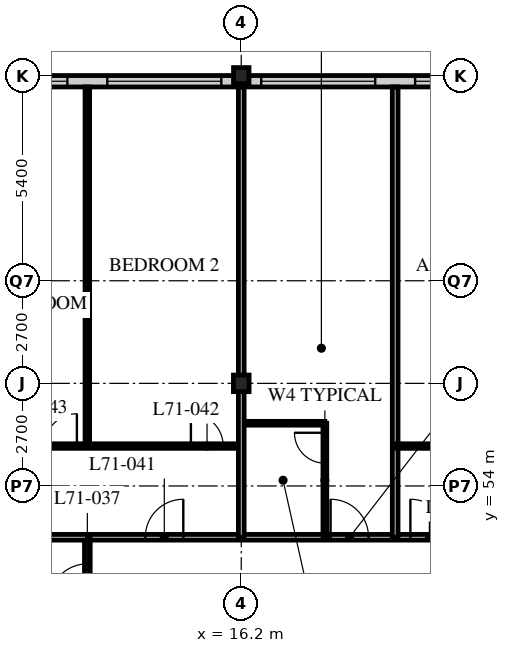
"""IFC4 building model, lengths in metres.
Left out: names, types, materials, properties, quantities, classifications, styles, units other than length and angle.
Written with IfcOpenShell. Run it as: python <this file> out.ifc"""

import sys

from ifc_helpers import new_model, si_unit, direction, frame, frame_2d, origin, origin_2d, place, context, subcontext, project, spatial, rectangle, i_section, extrude, element, fill, save


model = new_model("IFC4")
c1 = context("Model", 3, precision=1e-05, world=origin(), true_north=direction((0.0, 1.0)))
c2 = subcontext(c1, "Body", "Model", "MODEL_VIEW")
j1 = project(units=[si_unit("LENGTHUNIT", "METRE"), si_unit("PLANEANGLEUNIT", "RADIAN")], contexts=[c1])
p1 = place(None, origin())
s1 = spatial("IfcSite", under=j1, at=p1, CompositionType="ELEMENT")
p2 = place(p1, origin())
s2 = spatial("IfcBuilding", under=s1, at=p2, CompositionType="ELEMENT")
p3 = place(p2, frame((0.0, 0.0, 277.5)))
s3 = spatial("IfcBuildingStorey", under=s2, at=p3, CompositionType="ELEMENT", Elevation=277.5)
p4 = place(p3, frame((16.2, 56.7, 0.0), z_axis=(0.0, 0.0, 1.0), x_axis=(1.0, 0.0, 0.0)))
e1 = element("IfcColumn", 1, at=p4, inside=s3, PredefinedType="COLUMN", context=c2, shape_type="SweptSolid", body=[
    extrude(i_section(OverallWidth=0.412, OverallDepth=0.437, WebThickness=0.036, FlangeThickness=0.058, FilletRadius=0.015, at=origin_2d()), origin(), (0.0, 0.0, 1.0), 3.9),
])
p5 = place(p3, frame((16.2, 64.8, 0.0), z_axis=(0.0, 0.0, 1.0), x_axis=(1.0, 0.0, 0.0)))
e2 = element("IfcColumn", 2, at=p5, inside=s3, PredefinedType="COLUMN", context=c2, shape_type="SweptSolid", body=[
    extrude(i_section(OverallWidth=0.407, OverallDepth=0.419, WebThickness=0.031, FlangeThickness=0.049, FilletRadius=0.015, at=origin_2d()), origin(), (0.0, 0.0, 1.0), 3.9),
])
p6 = place(p3, frame((48.3, 64.65, 0.0), z_axis=(0.0, 0.0, 1.0), x_axis=(-1.0, 0.0, 0.0)))
e3 = element("IfcWall", 3, at=p6, inside=s3, PredefinedType="SOLIDWALL", context=c2, shape_type="SweptSolid", body=[
    extrude(rectangle(XDim=40.2, YDim=0.3, at=frame_2d((20.1, 0.0))), origin(), (0.0, 0.0, 1.0), 3.69),
])
p7 = place(p6, frame((0.225, 0.0, 0.6)))
e4 = element("IfcOpeningElement", 4, at=p7, cuts=e3, PredefinedType="OPENING", context=c2, shape_type="SweptSolid", body=[
    extrude(rectangle(XDim=3.0, YDim=2.4, at=frame_2d((1.5, 1.2))), frame((0.0, 0.16, 0.0), z_axis=(0.0, -1.0, 0.0), x_axis=(1.0, 0.0, 0.0)), (0.0, 0.0, 1.0), 0.32),
])
p8 = place(p6, frame((4.275, 0.0, 0.6)))
e5 = element("IfcOpeningElement", 5, at=p8, cuts=e3, PredefinedType="OPENING", context=c2, shape_type="SweptSolid", body=[
    extrude(rectangle(XDim=3.0, YDim=2.4, at=frame_2d((1.5, 1.2))), frame((0.0, 0.16, 0.0), z_axis=(0.0, -1.0, 0.0), x_axis=(1.0, 0.0, 0.0)), (0.0, 0.0, 1.0), 0.32),
])
p9 = place(p6, frame((8.325, 0.0, 0.6)))
e6 = element("IfcOpeningElement", 6, at=p9, cuts=e3, PredefinedType="OPENING", context=c2, shape_type="SweptSolid", body=[
    extrude(rectangle(XDim=3.0, YDim=2.4, at=frame_2d((1.5, 1.2))), frame((0.0, 0.16, 0.0), z_axis=(0.0, -1.0, 0.0), x_axis=(1.0, 0.0, 0.0)), (0.0, 0.0, 1.0), 0.32),
])
p10 = place(p6, frame((12.375, 0.0, 0.6)))
e7 = element("IfcOpeningElement", 7, at=p10, cuts=e3, PredefinedType="OPENING", context=c2, shape_type="SweptSolid", body=[
    extrude(rectangle(XDim=3.0, YDim=2.4, at=frame_2d((1.5, 1.2))), frame((0.0, 0.16, 0.0), z_axis=(0.0, -1.0, 0.0), x_axis=(1.0, 0.0, 0.0)), (0.0, 0.0, 1.0), 0.32),
])
p11 = place(p6, frame((16.425, 0.0, 0.6)))
e8 = element("IfcOpeningElement", 8, at=p11, cuts=e3, PredefinedType="OPENING", context=c2, shape_type="SweptSolid", body=[
    extrude(rectangle(XDim=3.0, YDim=2.4, at=frame_2d((1.5, 1.2))), frame((0.0, 0.16, 0.0), z_axis=(0.0, -1.0, 0.0), x_axis=(1.0, 0.0, 0.0)), (0.0, 0.0, 1.0), 0.32),
])
p12 = place(p6, frame((20.475, 0.0, 0.6)))
e9 = element("IfcOpeningElement", 9, at=p12, cuts=e3, PredefinedType="OPENING", context=c2, shape_type="SweptSolid", body=[
    extrude(rectangle(XDim=3.0, YDim=2.4, at=frame_2d((1.5, 1.2))), frame((0.0, 0.16, 0.0), z_axis=(0.0, -1.0, 0.0), x_axis=(1.0, 0.0, 0.0)), (0.0, 0.0, 1.0), 0.32),
])
p13 = place(p6, frame((24.525, 0.0, 0.6)))
e10 = element("IfcOpeningElement", 10, at=p13, cuts=e3, PredefinedType="OPENING", context=c2, shape_type="SweptSolid", body=[
    extrude(rectangle(XDim=3.0, YDim=2.4, at=frame_2d((1.5, 1.2))), frame((0.0, 0.16, 0.0), z_axis=(0.0, -1.0, 0.0), x_axis=(1.0, 0.0, 0.0)), (0.0, 0.0, 1.0), 0.32),
])
p14 = place(p6, frame((28.575, 0.0, 0.6)))
e11 = element("IfcOpeningElement", 11, at=p14, cuts=e3, PredefinedType="OPENING", context=c2, shape_type="SweptSolid", body=[
    extrude(rectangle(XDim=3.0, YDim=2.4, at=frame_2d((1.5, 1.2))), frame((0.0, 0.16, 0.0), z_axis=(0.0, -1.0, 0.0), x_axis=(1.0, 0.0, 0.0)), (0.0, 0.0, 1.0), 0.32),
])
p15 = place(p6, frame((32.625, 0.0, 0.6)))
e12 = element("IfcOpeningElement", 12, at=p15, cuts=e3, PredefinedType="OPENING", context=c2, shape_type="SweptSolid", body=[
    extrude(rectangle(XDim=3.0, YDim=2.4, at=frame_2d((1.5, 1.2))), frame((0.0, 0.16, 0.0), z_axis=(0.0, -1.0, 0.0), x_axis=(1.0, 0.0, 0.0)), (0.0, 0.0, 1.0), 0.32),
])
p16 = place(p6, frame((36.675, 0.0, 0.6)))
e13 = element("IfcOpeningElement", 13, at=p16, cuts=e3, PredefinedType="OPENING", context=c2, shape_type="SweptSolid", body=[
    extrude(rectangle(XDim=3.0, YDim=2.4, at=frame_2d((1.5, 1.2))), frame((0.0, 0.16, 0.0), z_axis=(0.0, -1.0, 0.0), x_axis=(1.0, 0.0, 0.0)), (0.0, 0.0, 1.0), 0.32),
])
p17 = place(p3, frame((12.15, 52.65, 0.0), z_axis=(0.0, 0.0, 1.0), x_axis=(1.0, 0.0, 0.0)))
e14 = element("IfcWall", 14, at=p17, inside=s3, PredefinedType="PARTITIONING", context=c2, shape_type="SweptSolid", body=[
    extrude(rectangle(XDim=24.3, YDim=0.15, at=frame_2d((12.15, 0.0))), origin(), (0.0, 0.0, 1.0), 3.69),
])
p18 = place(p17, frame((6.4, 0.0, 0.0)))
e15 = element("IfcOpeningElement", 15, at=p18, cuts=e14, PredefinedType="OPENING", context=c2, shape_type="SweptSolid", body=[
    extrude(rectangle(XDim=1.0, YDim=2.1, at=frame_2d((0.5, 1.05))), frame((0.0, 0.085, 0.0), z_axis=(0.0, -1.0, 0.0), x_axis=(1.0, 0.0, 0.0)), (0.0, 0.0, 1.0), 0.17),
])
p19 = place(p17, frame((8.5, 0.0, 0.0)))
e16 = element("IfcOpeningElement", 16, at=p19, cuts=e14, PredefinedType="OPENING", context=c2, shape_type="SweptSolid", body=[
    extrude(rectangle(XDim=1.0, YDim=2.1, at=frame_2d((0.5, 1.05))), frame((0.0, 0.085, 0.0), z_axis=(0.0, -1.0, 0.0), x_axis=(1.0, 0.0, 0.0)), (0.0, 0.0, 1.0), 0.17),
])
p20 = place(p17, frame((16.6, 0.0, 0.0)))
e17 = element("IfcOpeningElement", 17, at=p20, cuts=e14, PredefinedType="OPENING", context=c2, shape_type="SweptSolid", body=[
    extrude(rectangle(XDim=1.0, YDim=2.1, at=frame_2d((0.5, 1.05))), frame((0.0, 0.085, 0.0), z_axis=(0.0, -1.0, 0.0), x_axis=(1.0, 0.0, 0.0)), (0.0, 0.0, 1.0), 0.17),
])
p21 = place(p17, frame((1.525, 0.0, 0.0)))
e18 = element("IfcOpeningElement", 18, at=p21, cuts=e14, PredefinedType="OPENING", context=c2, shape_type="SweptSolid", body=[
    extrude(rectangle(XDim=1.0, YDim=2.1, at=frame_2d((0.5, 1.05))), frame((0.0, 0.085, 0.0), z_axis=(0.0, -1.0, 0.0), x_axis=(1.0, 0.0, 0.0)), (0.0, 0.0, 1.0), 0.17),
])
p22 = place(p3, frame((12.15, 22.5, 0.0), z_axis=(0.0, 0.0, 1.0), x_axis=(0.0, 1.0, 0.0)))
e19 = element("IfcWall", 19, at=p22, inside=s3, PredefinedType="PARTITIONING", context=c2, shape_type="SweptSolid", body=[
    extrude(rectangle(XDim=30.15, YDim=0.15, at=frame_2d((15.075, 0.0))), origin(), (0.0, 0.0, 1.0), 3.69),
])
p23 = place(p22, frame((0.4, 0.0, 0.0)))
e20 = element("IfcOpeningElement", 20, at=p23, cuts=e19, PredefinedType="OPENING", context=c2, shape_type="SweptSolid", body=[
    extrude(rectangle(XDim=1.0, YDim=2.1, at=frame_2d((0.5, 1.05))), frame((0.0, 0.085, 0.0), z_axis=(0.0, -1.0, 0.0), x_axis=(1.0, 0.0, 0.0)), (0.0, 0.0, 1.0), 0.17),
])
p24 = place(p22, frame((18.4, 0.0, 0.0)))
e21 = element("IfcOpeningElement", 21, at=p24, cuts=e19, PredefinedType="OPENING", context=c2, shape_type="SweptSolid", body=[
    extrude(rectangle(XDim=1.0, YDim=2.1, at=frame_2d((0.5, 1.05))), frame((0.0, 0.085, 0.0), z_axis=(0.0, -1.0, 0.0), x_axis=(1.0, 0.0, 0.0)), (0.0, 0.0, 1.0), 0.17),
])
p25 = place(p22, frame((28.45, 0.0, 0.0)))
e22 = element("IfcOpeningElement", 22, at=p25, cuts=e19, PredefinedType="OPENING", context=c2, shape_type="SweptSolid", body=[
    extrude(rectangle(XDim=1.0, YDim=2.1, at=frame_2d((0.5, 1.05))), frame((0.0, 0.085, 0.0), z_axis=(0.0, -1.0, 0.0), x_axis=(1.0, 0.0, 0.0)), (0.0, 0.0, 1.0), 0.17),
])
p26 = place(p3, frame((16.2, 55.65, 0.0), z_axis=(0.0, 0.0, 1.0), x_axis=(1.0, 0.0, 0.0)))
e23 = element("IfcWall", 23, at=p26, inside=s3, PredefinedType="PARTITIONING", context=c2, shape_type="SweptSolid", body=[
    extrude(rectangle(XDim=2.2, YDim=0.1, at=frame_2d((1.1, 0.0))), origin(), (0.0, 0.0, 1.0), 3.69),
])
p27 = place(p3, frame((18.4, 52.65, 0.0), z_axis=(0.0, 0.0, 1.0), x_axis=(0.0, 1.0, 0.0)))
e24 = element("IfcWall", 24, at=p27, inside=s3, PredefinedType="PARTITIONING", context=c2, shape_type="SweptSolid", body=[
    extrude(rectangle(XDim=3.0, YDim=0.1, at=frame_2d((1.5, 0.0))), origin(), (0.0, 0.0, 1.0), 3.69),
])
p28 = place(p27, frame((1.95, 0.0, 0.0)))
e25 = element("IfcOpeningElement", 25, at=p28, cuts=e24, PredefinedType="OPENING", context=c2, shape_type="SweptSolid", body=[
    extrude(rectangle(XDim=0.8, YDim=2.1, at=frame_2d((0.4, 1.05))), frame((0.0, 0.06, 0.0), z_axis=(0.0, -1.0, 0.0), x_axis=(1.0, 0.0, 0.0)), (0.0, 0.0, 1.0), 0.12),
])
p29 = place(p3, frame((20.25, 52.65, 0.0), z_axis=(0.0, 0.0, 1.0), x_axis=(0.0, 1.0, 0.0)))
e26 = element("IfcWall", 26, at=p29, inside=s3, PredefinedType="PARTITIONING", context=c2, shape_type="SweptSolid", body=[
    extrude(rectangle(XDim=11.85, YDim=0.15, at=frame_2d((5.925, 0.0))), origin(), (0.0, 0.0, 1.0), 3.69),
])
p30 = place(p3, frame((20.25, 55.05, 0.0), z_axis=(0.0, 0.0, 1.0), x_axis=(1.0, 0.0, 0.0)))
e27 = element("IfcWall", 27, at=p30, inside=s3, PredefinedType="PARTITIONING", context=c2, shape_type="SweptSolid", body=[
    extrude(rectangle(XDim=16.2, YDim=0.12, at=frame_2d((8.1, 0.0))), origin(), (0.0, 0.0, 1.0), 3.69),
])
p31 = place(p30, frame((0.975, 0.0, 0.0)))
e28 = element("IfcOpeningElement", 28, at=p31, cuts=e27, PredefinedType="OPENING", context=c2, shape_type="SweptSolid", body=[
    extrude(rectangle(XDim=0.85, YDim=2.1, at=frame_2d((0.425, 1.05))), frame((0.0, 0.07, 0.0), z_axis=(0.0, -1.0, 0.0), x_axis=(1.0, 0.0, 0.0)), (0.0, 0.0, 1.0), 0.14),
])
p32 = place(p30, frame((4.375, 0.0, 0.0)))
e29 = element("IfcOpeningElement", 29, at=p32, cuts=e27, PredefinedType="OPENING", context=c2, shape_type="SweptSolid", body=[
    extrude(rectangle(XDim=0.85, YDim=2.1, at=frame_2d((0.425, 1.05))), frame((0.0, 0.07, 0.0), z_axis=(0.0, -1.0, 0.0), x_axis=(1.0, 0.0, 0.0)), (0.0, 0.0, 1.0), 0.14),
])
p33 = place(p30, frame((9.075, 0.0, 0.0)))
e30 = element("IfcOpeningElement", 30, at=p33, cuts=e27, PredefinedType="OPENING", context=c2, shape_type="SweptSolid", body=[
    extrude(rectangle(XDim=0.85, YDim=2.1, at=frame_2d((0.425, 1.05))), frame((0.0, 0.07, 0.0), z_axis=(0.0, -1.0, 0.0), x_axis=(1.0, 0.0, 0.0)), (0.0, 0.0, 1.0), 0.14),
])
p34 = place(p30, frame((12.475, 0.0, 0.0)))
e31 = element("IfcOpeningElement", 31, at=p34, cuts=e27, PredefinedType="OPENING", context=c2, shape_type="SweptSolid", body=[
    extrude(rectangle(XDim=0.85, YDim=2.1, at=frame_2d((0.425, 1.05))), frame((0.0, 0.07, 0.0), z_axis=(0.0, -1.0, 0.0), x_axis=(1.0, 0.0, 0.0)), (0.0, 0.0, 1.0), 0.14),
])
p35 = place(p3, frame((8.15, 55.05, 0.0), z_axis=(0.0, 0.0, 1.0), x_axis=(1.0, 0.0, 0.0)))
e32 = element("IfcWall", 32, at=p35, inside=s3, PredefinedType="PARTITIONING", context=c2, shape_type="SweptSolid", body=[
    extrude(rectangle(XDim=8.05, YDim=0.12, at=frame_2d((4.025, 0.0))), origin(), (0.0, 0.0, 1.0), 3.69),
])
p36 = place(p35, frame((6.725, 0.0, 0.0)))
e33 = element("IfcOpeningElement", 33, at=p36, cuts=e32, PredefinedType="OPENING", context=c2, shape_type="SweptSolid", body=[
    extrude(rectangle(XDim=0.85, YDim=2.1, at=frame_2d((0.425, 1.05))), frame((0.0, 0.07, 0.0), z_axis=(0.0, -1.0, 0.0), x_axis=(1.0, 0.0, 0.0)), (0.0, 0.0, 1.0), 0.14),
])
p37 = place(p35, frame((2.875, 0.0, 0.0)))
e34 = element("IfcOpeningElement", 34, at=p37, cuts=e32, PredefinedType="OPENING", context=c2, shape_type="SweptSolid", body=[
    extrude(rectangle(XDim=0.85, YDim=2.1, at=frame_2d((0.425, 1.05))), frame((0.0, 0.07, 0.0), z_axis=(0.0, -1.0, 0.0), x_axis=(1.0, 0.0, 0.0)), (0.0, 0.0, 1.0), 0.14),
])
p38 = place(p3, frame((12.15, 55.05, 0.0), z_axis=(0.0, 0.0, 1.0), x_axis=(0.0, 1.0, 0.0)))
e35 = element("IfcWall", 35, at=p38, inside=s3, PredefinedType="PARTITIONING", context=c2, shape_type="SweptSolid", body=[
    extrude(rectangle(XDim=9.45, YDim=0.12, at=frame_2d((4.725, 0.0))), origin(), (0.0, 0.0, 1.0), 3.69),
])
p39 = place(p3, frame((0.3, 52.65, 0.0), z_axis=(0.0, 0.0, 1.0), x_axis=(1.0, 0.0, 0.0)))
e36 = element("IfcWall", 36, at=p39, inside=s3, PredefinedType="PARTITIONING", context=c2, shape_type="SweptSolid", body=[
    extrude(rectangle(XDim=11.85, YDim=0.15, at=frame_2d((5.925, 0.0))), origin(), (0.0, 0.0, 1.0), 3.69),
])
p40 = place(p3, frame((16.2, 52.65, 0.0), z_axis=(0.0, 0.0, 1.0), x_axis=(0.0, 1.0, 0.0)))
e37 = element("IfcWall", 37, at=p40, inside=s3, PredefinedType="PARTITIONING", context=c2, shape_type="SweptSolid", body=[
    extrude(rectangle(XDim=11.85, YDim=0.15, at=frame_2d((5.925, 0.0))), origin(), (0.0, 0.0, 1.0), 3.078),
])
p41 = place(p13, origin())
e38 = element("IfcWindow", 38, at=p41, inside=s3, PartitioningType="SINGLE_PANEL", PredefinedType="WINDOW", context=c2, shape_type="SweptSolid", body=[
    extrude(rectangle(XDim=3.0, YDim=2.4, at=frame_2d((1.5, 1.2))), frame((0.0, 0.03, 0.0), z_axis=(0.0, -1.0, 0.0), x_axis=(1.0, 0.0, 0.0)), (0.0, 0.0, 1.0), 0.06),
])
fill(e10, e38)
p42 = place(p14, origin())
e39 = element("IfcWindow", 39, at=p42, inside=s3, PartitioningType="SINGLE_PANEL", PredefinedType="WINDOW", context=c2, shape_type="SweptSolid", body=[
    extrude(rectangle(XDim=3.0, YDim=2.4, at=frame_2d((1.5, 1.2))), frame((0.0, 0.03, 0.0), z_axis=(0.0, -1.0, 0.0), x_axis=(1.0, 0.0, 0.0)), (0.0, 0.0, 1.0), 0.06),
])
fill(e11, e39)
p43 = place(p15, origin())
e40 = element("IfcWindow", 40, at=p43, inside=s3, PartitioningType="SINGLE_PANEL", PredefinedType="WINDOW", context=c2, shape_type="SweptSolid", body=[
    extrude(rectangle(XDim=3.0, YDim=2.4, at=frame_2d((1.5, 1.2))), frame((0.0, 0.03, 0.0), z_axis=(0.0, -1.0, 0.0), x_axis=(1.0, 0.0, 0.0)), (0.0, 0.0, 1.0), 0.06),
])
fill(e12, e40)
p44 = place(p16, origin())
e41 = element("IfcWindow", 41, at=p44, inside=s3, PartitioningType="SINGLE_PANEL", PredefinedType="WINDOW", context=c2, shape_type="SweptSolid", body=[
    extrude(rectangle(XDim=3.0, YDim=2.4, at=frame_2d((1.5, 1.2))), frame((0.0, 0.03, 0.0), z_axis=(0.0, -1.0, 0.0), x_axis=(1.0, 0.0, 0.0)), (0.0, 0.0, 1.0), 0.06),
])
fill(e13, e41)
p45 = place(p28, origin())
e42 = element("IfcDoor", 42, at=p45, inside=s3, OperationType="SINGLE_SWING_RIGHT", PredefinedType="DOOR", context=c2, shape_type="SweptSolid", body=[
    extrude(rectangle(XDim=0.8, YDim=2.1, at=frame_2d((0.4, 1.05))), frame((0.0, 0.025, 0.0), z_axis=(0.0, -1.0, 0.0), x_axis=(1.0, 0.0, 0.0)), (0.0, 0.0, 1.0), 0.05),
])
fill(e25, e42)
p46 = place(p18, origin())
e43 = element("IfcDoor", 43, at=p46, inside=s3, OperationType="SINGLE_SWING_LEFT", PredefinedType="DOOR", context=c2, shape_type="SweptSolid", body=[
    extrude(rectangle(XDim=1.0, YDim=2.1, at=frame_2d((0.5, 1.05))), frame((0.0, 0.025, 0.0), z_axis=(0.0, -1.0, 0.0), x_axis=(1.0, 0.0, 0.0)), (0.0, 0.0, 1.0), 0.05),
])
fill(e15, e43)
p47 = place(p19, origin())
e44 = element("IfcDoor", 44, at=p47, inside=s3, OperationType="SINGLE_SWING_LEFT", PredefinedType="DOOR", context=c2, shape_type="SweptSolid", body=[
    extrude(rectangle(XDim=1.0, YDim=2.1, at=frame_2d((0.5, 1.05))), frame((0.0, 0.025, 0.0), z_axis=(0.0, -1.0, 0.0), x_axis=(1.0, 0.0, 0.0)), (0.0, 0.0, 1.0), 0.05),
])
fill(e16, e44)
p48 = place(p25, origin())
e45 = element("IfcDoor", 45, at=p48, inside=s3, OperationType="SINGLE_SWING_LEFT", PredefinedType="DOOR", context=c2, shape_type="SweptSolid", body=[
    extrude(rectangle(XDim=1.0, YDim=2.1, at=frame_2d((0.5, 1.05))), frame((0.0, 0.025, 0.0), z_axis=(0.0, -1.0, 0.0), x_axis=(1.0, 0.0, 0.0)), (0.0, 0.0, 1.0), 0.05),
])
fill(e22, e45)
p49 = place(p21, origin())
e46 = element("IfcDoor", 46, at=p49, inside=s3, OperationType="SINGLE_SWING_RIGHT", PredefinedType="DOOR", context=c2, shape_type="SweptSolid", body=[
    extrude(rectangle(XDim=1.0, YDim=2.1, at=frame_2d((0.5, 1.05))), frame((0.0, 0.025, 0.0), z_axis=(0.0, -1.0, 0.0), x_axis=(1.0, 0.0, 0.0)), (0.0, 0.0, 1.0), 0.05),
])
fill(e18, e46)
p50 = place(p36, origin())
e47 = element("IfcDoor", 47, at=p50, inside=s3, OperationType="SINGLE_SWING_LEFT", PredefinedType="DOOR", context=c2, shape_type="SweptSolid", body=[
    extrude(rectangle(XDim=0.85, YDim=2.1, at=frame_2d((0.425, 1.05))), frame((0.0, 0.025, 0.0), z_axis=(0.0, -1.0, 0.0), x_axis=(1.0, 0.0, 0.0)), (0.0, 0.0, 1.0), 0.05),
])
fill(e33, e47)
p51 = place(p37, origin())
e48 = element("IfcDoor", 48, at=p51, inside=s3, OperationType="SINGLE_SWING_RIGHT", PredefinedType="DOOR", context=c2, shape_type="SweptSolid", body=[
    extrude(rectangle(XDim=0.85, YDim=2.1, at=frame_2d((0.425, 1.05))), frame((0.0, 0.025, 0.0), z_axis=(0.0, -1.0, 0.0), x_axis=(1.0, 0.0, 0.0)), (0.0, 0.0, 1.0), 0.05),
])
fill(e34, e48)
save(model, sys.argv[1])
